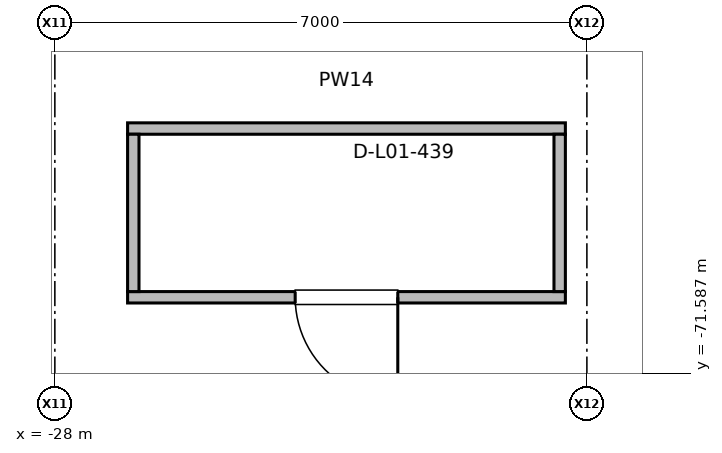
"""IFC4 building model, lengths in metres.
Left out: names, types, materials, properties, quantities, classifications, styles, units other than length and angle.
Written with IfcOpenShell. Run it as: python <this file> out.ifc"""

import sys

from ifc_helpers import new_model, si_unit, direction, frame, frame_2d, origin, place, context, subcontext, project, spatial, rectangle, extrude, element, fill, save


model = new_model("IFC4")
c1 = context("Model", 3, precision=1e-05, world=origin(), true_north=direction((0.0, 1.0)))
c2 = subcontext(c1, "Body", "Model", "MODEL_VIEW")
j1 = project(units=[si_unit("LENGTHUNIT", "METRE"), si_unit("PLANEANGLEUNIT", "RADIAN")], contexts=[c1])
p1 = place(None, origin())
s1 = spatial("IfcSite", under=j1, at=p1, CompositionType="ELEMENT")
p2 = place(p1, origin())
s2 = spatial("IfcBuilding", under=s1, at=p2, CompositionType="ELEMENT")
p3 = place(p2, origin())
s3 = spatial("IfcBuildingStorey", under=s2, at=p3, CompositionType="ELEMENT", Elevation=0.0)
p4 = place(p3, frame((-21.283, -70.588, 0.0), z_axis=(0.0, 0.0, 1.0), x_axis=(-1.0, 0.0, 0.0)))
e1 = element("IfcWall", 1, at=p4, inside=s3, PredefinedType="PARTITIONING", context=c2, shape_type="SweptSolid", body=[
    extrude(rectangle(XDim=5.76, YDim=0.15, at=frame_2d((2.88, 0.0))), origin(), (0.0, 0.0, 1.0), 5.02),
])
p5 = place(p4, frame((2.205, 0.0, 0.0)))
e2 = element("IfcOpeningElement", 2, at=p5, cuts=e1, PredefinedType="OPENING", context=c2, shape_type="SweptSolid", body=[
    extrude(rectangle(XDim=1.35, YDim=2.2, at=frame_2d((0.675, 1.1))), frame((0.0, 0.085, 0.0), z_axis=(0.0, -1.0, 0.0), x_axis=(1.0, 0.0, 0.0)), (0.0, 0.0, 1.0), 0.17),
])
p6 = place(p3, frame((-27.043, -68.368, 0.0), z_axis=(0.0, 0.0, 1.0), x_axis=(1.0, 0.0, 0.0)))
e3 = element("IfcWall", 3, at=p6, inside=s3, PredefinedType="PARTITIONING", context=c2, shape_type="SweptSolid", body=[
    extrude(rectangle(XDim=5.76, YDim=0.15, at=frame_2d((2.88, 0.0))), origin(), (0.0, 0.0, 1.0), 5.02),
])
for number, where, z_axis, x_axis in (
    (4, (-26.968, -70.513, 0.0), (0.0, 0.0, 1.0), (0.0, 1.0, 0.0)),
    (5, (-21.358, -70.513, 0.0), (0.0, 0.0, 1.0), (0.0, 1.0, 0.0)),
):
    element("IfcWall", number, at=place(p3, frame(where, z_axis=z_axis, x_axis=x_axis)), inside=s3, PredefinedType="PARTITIONING", context=c2, shape_type="SweptSolid", body=[
        extrude(rectangle(XDim=2.07, YDim=0.15, at=frame_2d((1.035, 0.0))), origin(), (0.0, 0.0, 1.0), 5.02),
    ])
p7 = place(p5, origin())
e6 = element("IfcDoor", 6, at=p7, inside=s3, OperationType="SINGLE_SWING_LEFT", PredefinedType="DOOR", context=c2, shape_type="SweptSolid", body=[
    extrude(rectangle(XDim=1.35, YDim=2.2, at=frame_2d((0.675, 1.1))), frame((0.0, 0.025, 0.0), z_axis=(0.0, -1.0, 0.0), x_axis=(1.0, 0.0, 0.0)), (0.0, 0.0, 1.0), 0.05),
])
fill(e2, e6)
save(model, sys.argv[1])
